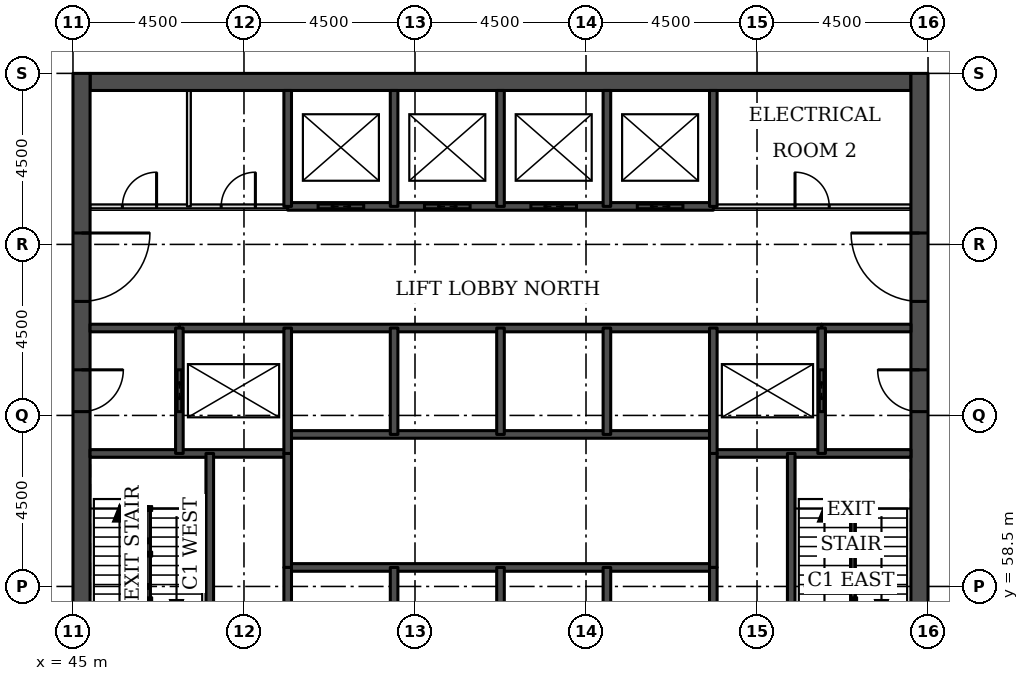
"""IFC4 building model, lengths in metres.
Left out: names, types, materials, properties, quantities, classifications, styles, units other than length and angle.
Written with IfcOpenShell. Run it as: python <this file> out.ifc"""

import sys

from ifc_helpers import new_model, si_unit, direction, frame, frame_2d, origin, place, context, subcontext, project, spatial, rectangle, extrude, element, fill, save


model = new_model("IFC4")
c1 = context("Model", 3, precision=1e-05, world=origin(), true_north=direction((0.0, 1.0)))
c2 = subcontext(c1, "Body", "Model", "MODEL_VIEW")
j1 = project(units=[si_unit("LENGTHUNIT", "METRE"), si_unit("PLANEANGLEUNIT", "RADIAN")], contexts=[c1])
p1 = place(None, origin())
s1 = spatial("IfcSite", under=j1, at=p1, CompositionType="ELEMENT")
p2 = place(p1, origin())
s2 = spatial("IfcBuilding", under=s1, at=p2, CompositionType="ELEMENT")
p3 = place(p2, frame((0.0, 0.0, 119.6)))
s3 = spatial("IfcBuildingStorey", under=s2, at=p3, CompositionType="ELEMENT", Elevation=119.6)
p4 = place(p3, frame((45.45, 71.775, 0.0), z_axis=(0.0, 0.0, 1.0), x_axis=(1.0, 0.0, 0.0)))
e1 = element("IfcWall", 1, at=p4, inside=s3, PredefinedType="SHEAR", context=c2, shape_type="SweptSolid", body=[
    extrude(rectangle(XDim=21.6, YDim=0.45, at=frame_2d((10.8, 0.0))), origin(), (0.0, 0.0, 1.0), 3.7),
])
p5 = place(p3, frame((45.225, 49.5, 0.0), z_axis=(0.0, 0.0, 1.0), x_axis=(0.0, 1.0, 0.0)))
e2 = element("IfcWall", 2, at=p5, inside=s3, PredefinedType="SHEAR", context=c2, shape_type="SweptSolid", body=[
    extrude(rectangle(XDim=22.5, YDim=0.45, at=frame_2d((11.25, 0.0))), origin(), (0.0, 0.0, 1.0), 3.7),
])
p6 = place(p5, frame((4.2, 0.0, 0.0)))
e3 = element("IfcOpeningElement", 3, at=p6, cuts=e2, PredefinedType="OPENING", context=c2, shape_type="SweptSolid", body=[
    extrude(rectangle(XDim=1.8, YDim=2.1, at=frame_2d((0.9, 1.05))), frame((0.0, 0.235, 0.0), z_axis=(0.0, -1.0, 0.0), x_axis=(1.0, 0.0, 0.0)), (0.0, 0.0, 1.0), 0.47),
])
p7 = place(p5, frame((6.9, 0.0, 0.0)))
e4 = element("IfcOpeningElement", 4, at=p7, cuts=e2, PredefinedType="OPENING", context=c2, shape_type="SweptSolid", body=[
    extrude(rectangle(XDim=1.1, YDim=2.1, at=frame_2d((0.55, 1.05))), frame((0.0, 0.235, 0.0), z_axis=(0.0, -1.0, 0.0), x_axis=(1.0, 0.0, 0.0)), (0.0, 0.0, 1.0), 0.47),
])
p8 = place(p5, frame((13.6, 0.0, 0.0)))
e5 = element("IfcOpeningElement", 5, at=p8, cuts=e2, PredefinedType="OPENING", context=c2, shape_type="SweptSolid", body=[
    extrude(rectangle(XDim=1.1, YDim=2.1, at=frame_2d((0.55, 1.05))), frame((0.0, 0.235, 0.0), z_axis=(0.0, -1.0, 0.0), x_axis=(1.0, 0.0, 0.0)), (0.0, 0.0, 1.0), 0.47),
])
p9 = place(p5, frame((16.5, 0.0, 0.0)))
e6 = element("IfcOpeningElement", 6, at=p9, cuts=e2, PredefinedType="OPENING", context=c2, shape_type="SweptSolid", body=[
    extrude(rectangle(XDim=1.8, YDim=2.1, at=frame_2d((0.9, 1.05))), frame((0.0, 0.235, 0.0), z_axis=(0.0, -1.0, 0.0), x_axis=(1.0, 0.0, 0.0)), (0.0, 0.0, 1.0), 0.47),
])
p10 = place(p3, frame((67.275, 49.5, 0.0), z_axis=(0.0, 0.0, 1.0), x_axis=(0.0, 1.0, 0.0)))
e7 = element("IfcWall", 7, at=p10, inside=s3, PredefinedType="SHEAR", context=c2, shape_type="SweptSolid", body=[
    extrude(rectangle(XDim=22.5, YDim=0.45, at=frame_2d((11.25, 0.0))), origin(), (0.0, 0.0, 1.0), 3.7),
])
p11 = place(p10, frame((4.2, 0.0, 0.0)))
e8 = element("IfcOpeningElement", 8, at=p11, cuts=e7, PredefinedType="OPENING", context=c2, shape_type="SweptSolid", body=[
    extrude(rectangle(XDim=1.8, YDim=2.1, at=frame_2d((0.9, 1.05))), frame((0.0, 0.235, 0.0), z_axis=(0.0, -1.0, 0.0), x_axis=(1.0, 0.0, 0.0)), (0.0, 0.0, 1.0), 0.47),
])
p12 = place(p10, frame((6.9, 0.0, 0.0)))
e9 = element("IfcOpeningElement", 9, at=p12, cuts=e7, PredefinedType="OPENING", context=c2, shape_type="SweptSolid", body=[
    extrude(rectangle(XDim=1.1, YDim=2.1, at=frame_2d((0.55, 1.05))), frame((0.0, 0.235, 0.0), z_axis=(0.0, -1.0, 0.0), x_axis=(1.0, 0.0, 0.0)), (0.0, 0.0, 1.0), 0.47),
])
p13 = place(p10, frame((13.6, 0.0, 0.0)))
e10 = element("IfcOpeningElement", 10, at=p13, cuts=e7, PredefinedType="OPENING", context=c2, shape_type="SweptSolid", body=[
    extrude(rectangle(XDim=1.1, YDim=2.1, at=frame_2d((0.55, 1.05))), frame((0.0, 0.235, 0.0), z_axis=(0.0, -1.0, 0.0), x_axis=(1.0, 0.0, 0.0)), (0.0, 0.0, 1.0), 0.47),
])
p14 = place(p10, frame((16.5, 0.0, 0.0)))
e11 = element("IfcOpeningElement", 11, at=p14, cuts=e7, PredefinedType="OPENING", context=c2, shape_type="SweptSolid", body=[
    extrude(rectangle(XDim=1.8, YDim=2.1, at=frame_2d((0.9, 1.05))), frame((0.0, 0.235, 0.0), z_axis=(0.0, -1.0, 0.0), x_axis=(1.0, 0.0, 0.0)), (0.0, 0.0, 1.0), 0.47),
])
p15 = place(p3, frame((50.65, 59.0, 0.0), z_axis=(0.0, 0.0, 1.0), x_axis=(1.0, 0.0, 0.0)))
e12 = element("IfcWall", 12, at=p15, inside=s3, PredefinedType="SOLIDWALL", context=c2, shape_type="SweptSolid", body=[
    extrude(rectangle(XDim=11.2, YDim=0.2, at=frame_2d((5.6, 0.0))), origin(), (0.0, 0.0, 1.0), 3.7),
])
for number, where, z_axis, x_axis in (
    (13, (45.45, 62.0, 0.0), (0.0, 0.0, 1.0), (1.0, 0.0, 0.0)),
    (14, (61.85, 62.0, 0.0), (0.0, 0.0, 1.0), (1.0, 0.0, 0.0)),
):
    element("IfcWall", number, at=place(p3, frame(where, z_axis=z_axis, x_axis=x_axis)), inside=s3, PredefinedType="SOLIDWALL", context=c2, shape_type="SweptSolid", body=[
        extrude(rectangle(XDim=5.2, YDim=0.2, at=frame_2d((2.6, 0.0))), origin(), (0.0, 0.0, 1.0), 3.55),
    ])
p16 = place(p3, frame((50.65, 62.5, 0.0), z_axis=(0.0, 0.0, 1.0), x_axis=(1.0, 0.0, 0.0)))
e15 = element("IfcWall", 15, at=p16, inside=s3, PredefinedType="SOLIDWALL", context=c2, shape_type="SweptSolid", body=[
    extrude(rectangle(XDim=11.2, YDim=0.2, at=frame_2d((5.6, 0.0))), origin(), (0.0, 0.0, 1.0), 3.7),
])
for number, where, z_axis, x_axis in (
    (16, (45.45, 65.3, 0.0), (0.0, 0.0, 1.0), (1.0, 0.0, 0.0)),
    (17, (64.7, 65.3, 0.0), (0.0, 0.0, 1.0), (1.0, 0.0, 0.0)),
):
    element("IfcWall", number, at=place(p3, frame(where, z_axis=z_axis, x_axis=x_axis)), inside=s3, PredefinedType="SOLIDWALL", context=c2, shape_type="SweptSolid", body=[
        extrude(rectangle(XDim=2.35, YDim=0.2, at=frame_2d((1.175, 0.0))), origin(), (0.0, 0.0, 1.0), 3.55),
    ])
p17 = place(p3, frame((47.8, 65.3, 0.0), z_axis=(0.0, 0.0, 1.0), x_axis=(1.0, 0.0, 0.0)))
e18 = element("IfcWall", 18, at=p17, inside=s3, PredefinedType="SOLIDWALL", context=c2, shape_type="SweptSolid", body=[
    extrude(rectangle(XDim=16.9, YDim=0.2, at=frame_2d((8.45, 0.0))), origin(), (0.0, 0.0, 1.0), 3.55),
])
p18 = place(p3, frame((45.45, 68.5, 0.0), z_axis=(0.0, 0.0, 1.0), x_axis=(1.0, 0.0, 0.0)))
e19 = element("IfcWall", 19, at=p18, inside=s3, PredefinedType="PARTITIONING", context=c2, shape_type="SweptSolid", body=[
    extrude(rectangle(XDim=5.2, YDim=0.1, at=frame_2d((2.6, 0.0))), origin(), (0.0, 0.0, 1.0), 3.55),
])
p19 = place(p18, frame((0.85, 0.0, 0.0)))
e20 = element("IfcOpeningElement", 20, at=p19, cuts=e19, PredefinedType="OPENING", context=c2, shape_type="SweptSolid", body=[
    extrude(rectangle(XDim=0.9, YDim=2.1, at=frame_2d((0.45, 1.05))), frame((0.0, 0.06, 0.0), z_axis=(0.0, -1.0, 0.0), x_axis=(1.0, 0.0, 0.0)), (0.0, 0.0, 1.0), 0.12),
])
p20 = place(p18, frame((3.45, 0.0, 0.0)))
e21 = element("IfcOpeningElement", 21, at=p20, cuts=e19, PredefinedType="OPENING", context=c2, shape_type="SweptSolid", body=[
    extrude(rectangle(XDim=0.9, YDim=2.1, at=frame_2d((0.45, 1.05))), frame((0.0, 0.06, 0.0), z_axis=(0.0, -1.0, 0.0), x_axis=(1.0, 0.0, 0.0)), (0.0, 0.0, 1.0), 0.12),
])
p21 = place(p3, frame((61.85, 68.5, 0.0), z_axis=(0.0, 0.0, 1.0), x_axis=(1.0, 0.0, 0.0)))
e22 = element("IfcWall", 22, at=p21, inside=s3, PredefinedType="PARTITIONING", context=c2, shape_type="SweptSolid", body=[
    extrude(rectangle(XDim=5.2, YDim=0.1, at=frame_2d((2.6, 0.0))), origin(), (0.0, 0.0, 1.0), 3.55),
])
p22 = place(p21, frame((2.15, 0.0, 0.0)))
e23 = element("IfcOpeningElement", 23, at=p22, cuts=e22, PredefinedType="OPENING", context=c2, shape_type="SweptSolid", body=[
    extrude(rectangle(XDim=0.9, YDim=2.1, at=frame_2d((0.45, 1.05))), frame((0.0, 0.06, 0.0), z_axis=(0.0, -1.0, 0.0), x_axis=(1.0, 0.0, 0.0)), (0.0, 0.0, 1.0), 0.12),
])
p23 = place(p3, frame((50.65, 68.5, 0.0), z_axis=(0.0, 0.0, 1.0), x_axis=(1.0, 0.0, 0.0)))
e24 = element("IfcWall", 24, at=p23, inside=s3, PredefinedType="SOLIDWALL", context=c2, shape_type="SweptSolid", body=[
    extrude(rectangle(XDim=11.2, YDim=0.2, at=frame_2d((5.6, 0.0))), origin(), (0.0, 0.0, 1.0), 3.55),
])
p24 = place(p23, frame((0.8, 0.0, 0.0)))
e25 = element("IfcOpeningElement", 25, at=p24, cuts=e24, PredefinedType="OPENING", context=c2, shape_type="SweptSolid", body=[
    extrude(rectangle(XDim=1.2, YDim=2.1, at=frame_2d((0.6, 1.05))), frame((0.0, 0.11, 0.0), z_axis=(0.0, -1.0, 0.0), x_axis=(1.0, 0.0, 0.0)), (0.0, 0.0, 1.0), 0.22),
])
p25 = place(p23, frame((3.6, 0.0, 0.0)))
e26 = element("IfcOpeningElement", 26, at=p25, cuts=e24, PredefinedType="OPENING", context=c2, shape_type="SweptSolid", body=[
    extrude(rectangle(XDim=1.2, YDim=2.1, at=frame_2d((0.6, 1.05))), frame((0.0, 0.11, 0.0), z_axis=(0.0, -1.0, 0.0), x_axis=(1.0, 0.0, 0.0)), (0.0, 0.0, 1.0), 0.22),
])
p26 = place(p23, frame((6.4, 0.0, 0.0)))
e27 = element("IfcOpeningElement", 27, at=p26, cuts=e24, PredefinedType="OPENING", context=c2, shape_type="SweptSolid", body=[
    extrude(rectangle(XDim=1.2, YDim=2.1, at=frame_2d((0.6, 1.05))), frame((0.0, 0.11, 0.0), z_axis=(0.0, -1.0, 0.0), x_axis=(1.0, 0.0, 0.0)), (0.0, 0.0, 1.0), 0.22),
])
p27 = place(p23, frame((9.2, 0.0, 0.0)))
e28 = element("IfcOpeningElement", 28, at=p27, cuts=e24, PredefinedType="OPENING", context=c2, shape_type="SweptSolid", body=[
    extrude(rectangle(XDim=1.2, YDim=2.1, at=frame_2d((0.6, 1.05))), frame((0.0, 0.11, 0.0), z_axis=(0.0, -1.0, 0.0), x_axis=(1.0, 0.0, 0.0)), (0.0, 0.0, 1.0), 0.22),
])
p28 = place(p3, frame((47.8, 62.0, 0.0), z_axis=(0.0, 0.0, 1.0), x_axis=(0.0, 1.0, 0.0)))
e29 = element("IfcWall", 29, at=p28, inside=s3, PredefinedType="SOLIDWALL", context=c2, shape_type="SweptSolid", body=[
    extrude(rectangle(XDim=3.3, YDim=0.2, at=frame_2d((1.65, 0.0))), origin(), (0.0, 0.0, 1.0), 3.55),
])
p29 = place(p28, frame((1.1, 0.0, 0.0)))
e30 = element("IfcOpeningElement", 30, at=p29, cuts=e29, PredefinedType="OPENING", context=c2, shape_type="SweptSolid", body=[
    extrude(rectangle(XDim=1.1, YDim=2.1, at=frame_2d((0.55, 1.05))), frame((0.0, 0.11, 0.0), z_axis=(0.0, -1.0, 0.0), x_axis=(1.0, 0.0, 0.0)), (0.0, 0.0, 1.0), 0.22),
])
p30 = place(p3, frame((48.05, 68.5, 0.0), z_axis=(0.0, 0.0, 1.0), x_axis=(0.0, 1.0, 0.0)))
e31 = element("IfcWall", 31, at=p30, inside=s3, PredefinedType="PARTITIONING", context=c2, shape_type="SweptSolid", body=[
    extrude(rectangle(XDim=3.05, YDim=0.1, at=frame_2d((1.525, 0.0))), origin(), (0.0, 0.0, 1.0), 3.55),
])
p31 = place(p3, frame((48.6, 56.2, 0.0), z_axis=(0.0, 0.0, 1.0), x_axis=(0.0, 1.0, 0.0)))
e32 = element("IfcWall", 32, at=p31, inside=s3, PredefinedType="SOLIDWALL", context=c2, shape_type="SweptSolid", body=[
    extrude(rectangle(XDim=5.8, YDim=0.2, at=frame_2d((2.9, 0.0))), origin(), (0.0, 0.0, 1.0), 3.55),
])
p32 = place(p3, frame((50.65, 59.0, 0.0), z_axis=(0.0, 0.0, 1.0), x_axis=(0.0, 1.0, 0.0)))
e33 = element("IfcWall", 33, at=p32, inside=s3, PredefinedType="SOLIDWALL", context=c2, shape_type="SweptSolid", body=[
    extrude(rectangle(XDim=3.0, YDim=0.2, at=frame_2d((1.5, 0.0))), origin(), (0.0, 0.0, 1.0), 3.7),
])
p33 = place(p3, frame((50.65, 56.2, 0.0), z_axis=(0.0, 0.0, 1.0), x_axis=(0.0, 1.0, 0.0)))
e34 = element("IfcWall", 34, at=p33, inside=s3, PredefinedType="SOLIDWALL", context=c2, shape_type="SweptSolid", body=[
    extrude(rectangle(XDim=2.8, YDim=0.2, at=frame_2d((1.4, 0.0))), origin(), (0.0, 0.0, 1.0), 3.55),
])
p34 = place(p3, frame((50.65, 62.0, 0.0), z_axis=(0.0, 0.0, 1.0), x_axis=(0.0, 1.0, 0.0)))
e35 = element("IfcWall", 35, at=p34, inside=s3, PredefinedType="SOLIDWALL", context=c2, shape_type="SweptSolid", body=[
    extrude(rectangle(XDim=3.3, YDim=0.2, at=frame_2d((1.65, 0.0))), origin(), (0.0, 0.0, 1.0), 3.55),
])
p35 = place(p3, frame((50.65, 68.5, 0.0), z_axis=(0.0, 0.0, 1.0), x_axis=(0.0, 1.0, 0.0)))
e36 = element("IfcWall", 36, at=p35, inside=s3, PredefinedType="SOLIDWALL", context=c2, shape_type="SweptSolid", body=[
    extrude(rectangle(XDim=3.05, YDim=0.2, at=frame_2d((1.525, 0.0))), origin(), (0.0, 0.0, 1.0), 3.55),
])
for number, where, z_axis, x_axis in (
    (37, (53.45, 56.2, 0.0), (0.0, 0.0, 1.0), (0.0, 1.0, 0.0)),
    (38, (53.45, 62.5, 0.0), (0.0, 0.0, 1.0), (0.0, 1.0, 0.0)),
):
    element("IfcWall", number, at=place(p3, frame(where, z_axis=z_axis, x_axis=x_axis)), inside=s3, PredefinedType="SOLIDWALL", context=c2, shape_type="SweptSolid", body=[
        extrude(rectangle(XDim=2.8, YDim=0.2, at=frame_2d((1.4, 0.0))), origin(), (0.0, 0.0, 1.0), 3.55),
    ])
p36 = place(p3, frame((53.45, 68.5, 0.0), z_axis=(0.0, 0.0, 1.0), x_axis=(0.0, 1.0, 0.0)))
e39 = element("IfcWall", 39, at=p36, inside=s3, PredefinedType="SOLIDWALL", context=c2, shape_type="SweptSolid", body=[
    extrude(rectangle(XDim=3.05, YDim=0.2, at=frame_2d((1.525, 0.0))), origin(), (0.0, 0.0, 1.0), 3.55),
])
for number, where, z_axis, x_axis in (
    (40, (56.25, 56.2, 0.0), (0.0, 0.0, 1.0), (0.0, 1.0, 0.0)),
    (41, (56.25, 62.5, 0.0), (0.0, 0.0, 1.0), (0.0, 1.0, 0.0)),
):
    element("IfcWall", number, at=place(p3, frame(where, z_axis=z_axis, x_axis=x_axis)), inside=s3, PredefinedType="SOLIDWALL", context=c2, shape_type="SweptSolid", body=[
        extrude(rectangle(XDim=2.8, YDim=0.2, at=frame_2d((1.4, 0.0))), origin(), (0.0, 0.0, 1.0), 3.55),
    ])
p37 = place(p3, frame((56.25, 68.5, 0.0), z_axis=(0.0, 0.0, 1.0), x_axis=(0.0, 1.0, 0.0)))
e42 = element("IfcWall", 42, at=p37, inside=s3, PredefinedType="SOLIDWALL", context=c2, shape_type="SweptSolid", body=[
    extrude(rectangle(XDim=3.05, YDim=0.2, at=frame_2d((1.525, 0.0))), origin(), (0.0, 0.0, 1.0), 3.55),
])
for number, where, z_axis, x_axis in (
    (43, (59.05, 56.2, 0.0), (0.0, 0.0, 1.0), (0.0, 1.0, 0.0)),
    (44, (59.05, 62.5, 0.0), (0.0, 0.0, 1.0), (0.0, 1.0, 0.0)),
):
    element("IfcWall", number, at=place(p3, frame(where, z_axis=z_axis, x_axis=x_axis)), inside=s3, PredefinedType="SOLIDWALL", context=c2, shape_type="SweptSolid", body=[
        extrude(rectangle(XDim=2.8, YDim=0.2, at=frame_2d((1.4, 0.0))), origin(), (0.0, 0.0, 1.0), 3.55),
    ])
p38 = place(p3, frame((59.05, 68.5, 0.0), z_axis=(0.0, 0.0, 1.0), x_axis=(0.0, 1.0, 0.0)))
e45 = element("IfcWall", 45, at=p38, inside=s3, PredefinedType="SOLIDWALL", context=c2, shape_type="SweptSolid", body=[
    extrude(rectangle(XDim=3.05, YDim=0.2, at=frame_2d((1.525, 0.0))), origin(), (0.0, 0.0, 1.0), 3.55),
])
p39 = place(p3, frame((61.85, 59.0, 0.0), z_axis=(0.0, 0.0, 1.0), x_axis=(0.0, 1.0, 0.0)))
e46 = element("IfcWall", 46, at=p39, inside=s3, PredefinedType="SOLIDWALL", context=c2, shape_type="SweptSolid", body=[
    extrude(rectangle(XDim=3.0, YDim=0.2, at=frame_2d((1.5, 0.0))), origin(), (0.0, 0.0, 1.0), 3.7),
])
p40 = place(p3, frame((61.85, 56.2, 0.0), z_axis=(0.0, 0.0, 1.0), x_axis=(0.0, 1.0, 0.0)))
e47 = element("IfcWall", 47, at=p40, inside=s3, PredefinedType="SOLIDWALL", context=c2, shape_type="SweptSolid", body=[
    extrude(rectangle(XDim=2.8, YDim=0.2, at=frame_2d((1.4, 0.0))), origin(), (0.0, 0.0, 1.0), 3.55),
])
p41 = place(p3, frame((61.85, 62.0, 0.0), z_axis=(0.0, 0.0, 1.0), x_axis=(0.0, 1.0, 0.0)))
e48 = element("IfcWall", 48, at=p41, inside=s3, PredefinedType="SOLIDWALL", context=c2, shape_type="SweptSolid", body=[
    extrude(rectangle(XDim=3.3, YDim=0.2, at=frame_2d((1.65, 0.0))), origin(), (0.0, 0.0, 1.0), 3.55),
])
p42 = place(p3, frame((61.85, 68.5, 0.0), z_axis=(0.0, 0.0, 1.0), x_axis=(0.0, 1.0, 0.0)))
e49 = element("IfcWall", 49, at=p42, inside=s3, PredefinedType="SOLIDWALL", context=c2, shape_type="SweptSolid", body=[
    extrude(rectangle(XDim=3.05, YDim=0.2, at=frame_2d((1.525, 0.0))), origin(), (0.0, 0.0, 1.0), 3.55),
])
p43 = place(p3, frame((63.9, 56.2, 0.0), z_axis=(0.0, 0.0, 1.0), x_axis=(0.0, 1.0, 0.0)))
e50 = element("IfcWall", 50, at=p43, inside=s3, PredefinedType="SOLIDWALL", context=c2, shape_type="SweptSolid", body=[
    extrude(rectangle(XDim=5.8, YDim=0.2, at=frame_2d((2.9, 0.0))), origin(), (0.0, 0.0, 1.0), 3.55),
])
p44 = place(p3, frame((64.7, 62.0, 0.0), z_axis=(0.0, 0.0, 1.0), x_axis=(0.0, 1.0, 0.0)))
e51 = element("IfcWall", 51, at=p44, inside=s3, PredefinedType="SOLIDWALL", context=c2, shape_type="SweptSolid", body=[
    extrude(rectangle(XDim=3.3, YDim=0.2, at=frame_2d((1.65, 0.0))), origin(), (0.0, 0.0, 1.0), 3.55),
])
p45 = place(p44, frame((1.1, 0.0, 0.0)))
e52 = element("IfcOpeningElement", 52, at=p45, cuts=e51, PredefinedType="OPENING", context=c2, shape_type="SweptSolid", body=[
    extrude(rectangle(XDim=1.1, YDim=2.1, at=frame_2d((0.55, 1.05))), frame((0.0, 0.11, 0.0), z_axis=(0.0, -1.0, 0.0), x_axis=(1.0, 0.0, 0.0)), (0.0, 0.0, 1.0), 0.22),
])
p46 = place(p24, origin())
e53 = element("IfcDoor", 53, at=p46, inside=s3, OperationType="DOUBLE_DOOR_SLIDING", PredefinedType="DOOR", context=c2, shape_type="SweptSolid", body=[
    extrude(rectangle(XDim=1.2, YDim=2.1, at=frame_2d((0.6, 1.05))), frame((0.0, 0.025, 0.0), z_axis=(0.0, -1.0, 0.0), x_axis=(1.0, 0.0, 0.0)), (0.0, 0.0, 1.0), 0.05),
])
fill(e25, e53)
p47 = place(p25, origin())
e54 = element("IfcDoor", 54, at=p47, inside=s3, OperationType="DOUBLE_DOOR_SLIDING", PredefinedType="DOOR", context=c2, shape_type="SweptSolid", body=[
    extrude(rectangle(XDim=1.2, YDim=2.1, at=frame_2d((0.6, 1.05))), frame((0.0, 0.025, 0.0), z_axis=(0.0, -1.0, 0.0), x_axis=(1.0, 0.0, 0.0)), (0.0, 0.0, 1.0), 0.05),
])
fill(e26, e54)
p48 = place(p26, origin())
e55 = element("IfcDoor", 55, at=p48, inside=s3, OperationType="DOUBLE_DOOR_SLIDING", PredefinedType="DOOR", context=c2, shape_type="SweptSolid", body=[
    extrude(rectangle(XDim=1.2, YDim=2.1, at=frame_2d((0.6, 1.05))), frame((0.0, 0.025, 0.0), z_axis=(0.0, -1.0, 0.0), x_axis=(1.0, 0.0, 0.0)), (0.0, 0.0, 1.0), 0.05),
])
fill(e27, e55)
p49 = place(p27, origin())
e56 = element("IfcDoor", 56, at=p49, inside=s3, OperationType="DOUBLE_DOOR_SLIDING", PredefinedType="DOOR", context=c2, shape_type="SweptSolid", body=[
    extrude(rectangle(XDim=1.2, YDim=2.1, at=frame_2d((0.6, 1.05))), frame((0.0, 0.025, 0.0), z_axis=(0.0, -1.0, 0.0), x_axis=(1.0, 0.0, 0.0)), (0.0, 0.0, 1.0), 0.05),
])
fill(e28, e56)
p50 = place(p29, origin())
e57 = element("IfcDoor", 57, at=p50, inside=s3, OperationType="DOUBLE_DOOR_SLIDING", PredefinedType="DOOR", context=c2, shape_type="SweptSolid", body=[
    extrude(rectangle(XDim=1.1, YDim=2.1, at=frame_2d((0.55, 1.05))), frame((0.0, 0.025, 0.0), z_axis=(0.0, -1.0, 0.0), x_axis=(1.0, 0.0, 0.0)), (0.0, 0.0, 1.0), 0.05),
])
fill(e30, e57)
p51 = place(p45, origin())
e58 = element("IfcDoor", 58, at=p51, inside=s3, OperationType="DOUBLE_DOOR_SLIDING", PredefinedType="DOOR", context=c2, shape_type="SweptSolid", body=[
    extrude(rectangle(XDim=1.1, YDim=2.1, at=frame_2d((0.55, 1.05))), frame((0.0, 0.025, 0.0), z_axis=(0.0, -1.0, 0.0), x_axis=(1.0, 0.0, 0.0)), (0.0, 0.0, 1.0), 0.05),
])
fill(e52, e58)
p52 = place(p8, frame((1.1, 0.0, 0.0), z_axis=(0.0, 0.0, 1.0), x_axis=(-1.0, 0.0, 0.0)))
e59 = element("IfcDoor", 59, at=p52, inside=s3, OperationType="SINGLE_SWING_LEFT", PredefinedType="DOOR", context=c2, shape_type="SweptSolid", body=[
    extrude(rectangle(XDim=1.1, YDim=2.1, at=frame_2d((0.55, 1.05))), frame((0.0, 0.025, 0.0), z_axis=(0.0, -1.0, 0.0), x_axis=(1.0, 0.0, 0.0)), (0.0, 0.0, 1.0), 0.05),
])
fill(e5, e59)
p53 = place(p9, frame((1.8, 0.0, 0.0), z_axis=(0.0, 0.0, 1.0), x_axis=(-1.0, 0.0, 0.0)))
e60 = element("IfcDoor", 60, at=p53, inside=s3, OperationType="SINGLE_SWING_LEFT", PredefinedType="DOOR", context=c2, shape_type="SweptSolid", body=[
    extrude(rectangle(XDim=1.8, YDim=2.1, at=frame_2d((0.9, 1.05))), frame((0.0, 0.025, 0.0), z_axis=(0.0, -1.0, 0.0), x_axis=(1.0, 0.0, 0.0)), (0.0, 0.0, 1.0), 0.05),
])
fill(e6, e60)
p54 = place(p13, origin())
e61 = element("IfcDoor", 61, at=p54, inside=s3, OperationType="SINGLE_SWING_RIGHT", PredefinedType="DOOR", context=c2, shape_type="SweptSolid", body=[
    extrude(rectangle(XDim=1.1, YDim=2.1, at=frame_2d((0.55, 1.05))), frame((0.0, 0.025, 0.0), z_axis=(0.0, -1.0, 0.0), x_axis=(1.0, 0.0, 0.0)), (0.0, 0.0, 1.0), 0.05),
])
fill(e10, e61)
p55 = place(p14, origin())
e62 = element("IfcDoor", 62, at=p55, inside=s3, OperationType="SINGLE_SWING_RIGHT", PredefinedType="DOOR", context=c2, shape_type="SweptSolid", body=[
    extrude(rectangle(XDim=1.8, YDim=2.1, at=frame_2d((0.9, 1.05))), frame((0.0, 0.025, 0.0), z_axis=(0.0, -1.0, 0.0), x_axis=(1.0, 0.0, 0.0)), (0.0, 0.0, 1.0), 0.05),
])
fill(e11, e62)
p56 = place(p22, origin())
e63 = element("IfcDoor", 63, at=p56, inside=s3, OperationType="SINGLE_SWING_LEFT", PredefinedType="DOOR", context=c2, shape_type="SweptSolid", body=[
    extrude(rectangle(XDim=0.9, YDim=2.1, at=frame_2d((0.45, 1.05))), frame((0.0, 0.025, 0.0), z_axis=(0.0, -1.0, 0.0), x_axis=(1.0, 0.0, 0.0)), (0.0, 0.0, 1.0), 0.05),
])
fill(e23, e63)
p57 = place(p19, origin())
e64 = element("IfcDoor", 64, at=p57, inside=s3, OperationType="SINGLE_SWING_RIGHT", PredefinedType="DOOR", context=c2, shape_type="SweptSolid", body=[
    extrude(rectangle(XDim=0.9, YDim=2.1, at=frame_2d((0.45, 1.05))), frame((0.0, 0.025, 0.0), z_axis=(0.0, -1.0, 0.0), x_axis=(1.0, 0.0, 0.0)), (0.0, 0.0, 1.0), 0.05),
])
fill(e20, e64)
p58 = place(p20, origin())
e65 = element("IfcDoor", 65, at=p58, inside=s3, OperationType="SINGLE_SWING_RIGHT", PredefinedType="DOOR", context=c2, shape_type="SweptSolid", body=[
    extrude(rectangle(XDim=0.9, YDim=2.1, at=frame_2d((0.45, 1.05))), frame((0.0, 0.025, 0.0), z_axis=(0.0, -1.0, 0.0), x_axis=(1.0, 0.0, 0.0)), (0.0, 0.0, 1.0), 0.05),
])
fill(e21, e65)
save(model, sys.argv[1])
